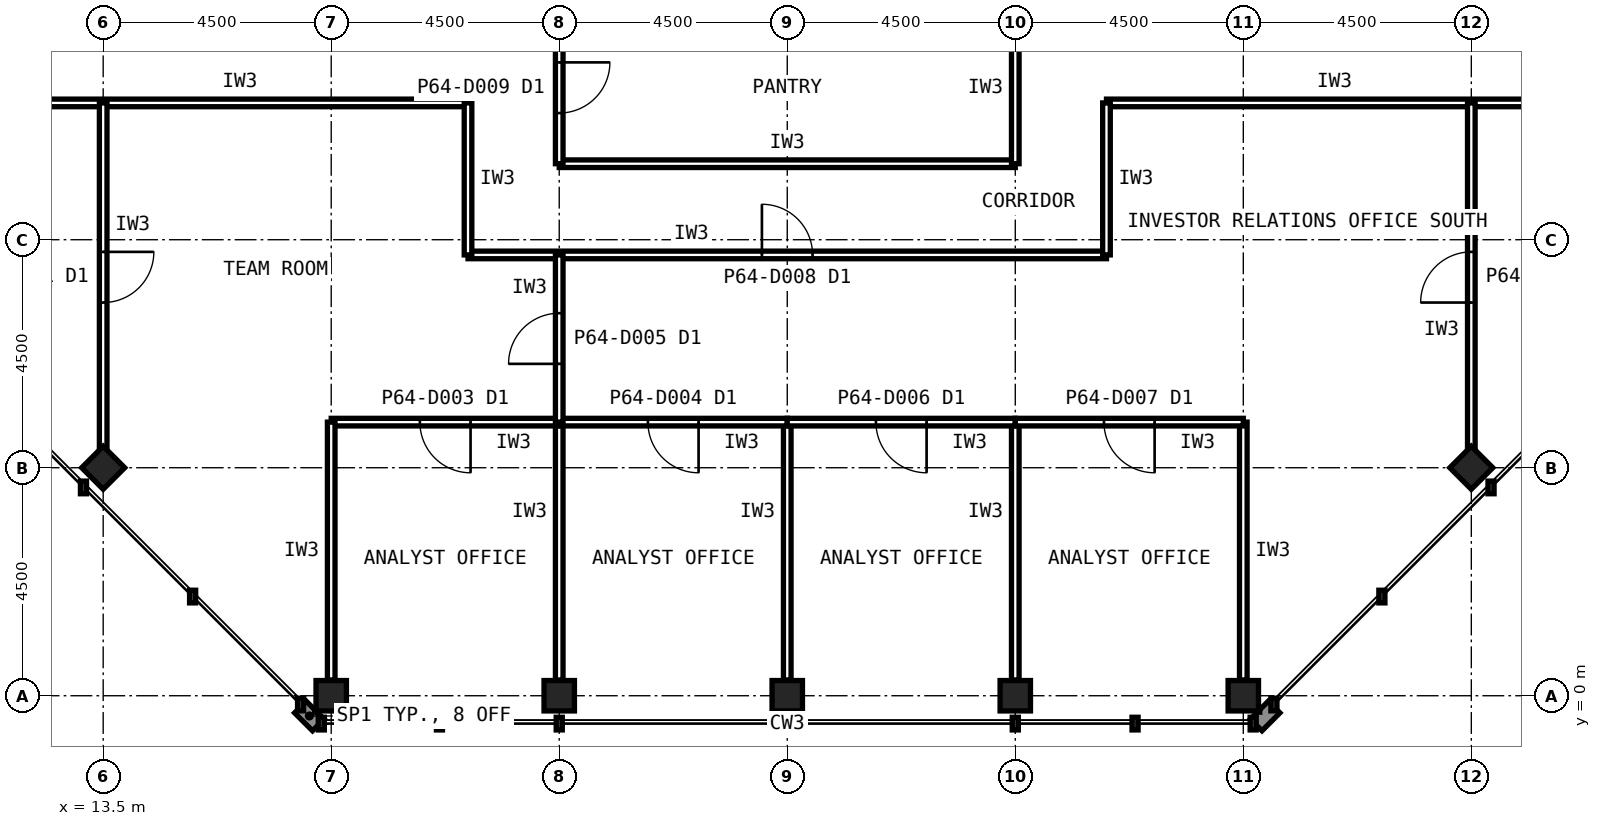
"""IFC4 building model, lengths in metres.
Left out: names, types, materials, properties, quantities, classifications, styles, units other than length and angle.
Written with IfcOpenShell. Run it as: python <this file> out.ifc"""

import sys

from ifc_helpers import new_model, si_unit, direction, frame, frame_2d, origin, origin_2d, place, context, subcontext, project, spatial, rectangle, hollow_rectangle, extrude, element, fill, save


model = new_model("IFC4")
c1 = context("Model", 3, precision=1e-05, world=origin(), true_north=direction((0.0, 1.0)))
c2 = subcontext(c1, "Body", "Model", "MODEL_VIEW")
j1 = project(units=[si_unit("LENGTHUNIT", "METRE"), si_unit("PLANEANGLEUNIT", "RADIAN")], contexts=[c1])
p1 = place(None, origin())
s1 = spatial("IfcSite", under=j1, at=p1, CompositionType="ELEMENT")
p2 = place(p1, origin())
s2 = spatial("IfcBuilding", under=s1, at=p2, CompositionType="ELEMENT")
p3 = place(p2, frame((0.0, 0.0, 270.6)))
s3 = spatial("IfcBuildingStorey", under=s2, at=p3, CompositionType="ELEMENT", Elevation=270.6)
for number, where, z_axis, x_axis in (
    (1, (18.0, 0.0, 0.0), (0.0, 0.0, 1.0), (1.0, 0.0, 0.0)),
    (2, (22.5, 0.0, 0.0), (0.0, 0.0, 1.0), (1.0, 0.0, 0.0)),
    (3, (27.0, 0.0, 0.0), (0.0, 0.0, 1.0), (1.0, 0.0, 0.0)),
    (4, (31.5, 0.0, 0.0), (0.0, 0.0, 1.0), (1.0, 0.0, 0.0)),
    (5, (36.0, 0.0, 0.0), (0.0, 0.0, 1.0), (1.0, 0.0, 0.0)),
    (6, (13.5, 4.5, 0.0), (0.0, 0.0, 1.0), (0.707, 0.707, 0.0)),
    (7, (40.5, 4.5, 0.0), (0.0, 0.0, 1.0), (0.707, 0.707, 0.0)),
):
    element("IfcColumn", number, at=place(p3, frame(where, z_axis=z_axis, x_axis=x_axis)), inside=s3, PredefinedType="COLUMN", context=c2, shape_type="SweptSolid", body=[
        extrude(hollow_rectangle(XDim=0.6, YDim=0.6, WallThickness=0.028, at=origin_2d()), origin(), (0.0, 0.0, 1.0), 4.0),
    ])
p4 = place(p3, frame((20.7, 8.7, 0.0), z_axis=(0.0, 0.0, 1.0), x_axis=(1.0, 0.0, 0.0)))
e8 = element("IfcWall", 8, at=p4, inside=s3, PredefinedType="PARTITIONING", context=c2, shape_type="SweptSolid", body=[
    extrude(rectangle(XDim=12.6, YDim=0.15, at=frame_2d((6.3, 0.0))), origin(), (0.0, 0.0, 1.0), 3.84),
])
p5 = place(p4, frame((5.8, 0.0, 0.0)))
e9 = element("IfcOpeningElement", 9, at=p5, cuts=e8, PredefinedType="OPENING", context=c2, shape_type="SweptSolid", body=[
    extrude(rectangle(XDim=1.0, YDim=2.1, at=frame_2d((0.5, 1.05))), frame((0.0, 0.085, 0.0), z_axis=(0.0, -1.0, 0.0), x_axis=(1.0, 0.0, 0.0)), (0.0, 0.0, 1.0), 0.17),
])
for number, where, z_axis, x_axis in (
    (10, (11.7, 11.7, 0.0), (0.0, 0.0, 1.0), (1.0, 0.0, 0.0)),
    (11, (33.3, 11.7, 0.0), (0.0, 0.0, 1.0), (1.0, 0.0, 0.0)),
):
    element("IfcWall", number, at=place(p3, frame(where, z_axis=z_axis, x_axis=x_axis)), inside=s3, PredefinedType="PARTITIONING", context=c2, shape_type="SweptSolid", body=[
        extrude(rectangle(XDim=9.0, YDim=0.15, at=frame_2d((4.5, 0.0))), origin(), (0.0, 0.0, 1.0), 3.84),
    ])
for number, where, z_axis, x_axis in (
    (12, (20.7, 11.7, 0.0), (0.0, 0.0, 1.0), (0.0, -1.0, 0.0)),
    (13, (33.3, 8.7, 0.0), (0.0, 0.0, 1.0), (0.0, 1.0, 0.0)),
):
    element("IfcWall", number, at=place(p3, frame(where, z_axis=z_axis, x_axis=x_axis)), inside=s3, PredefinedType="PARTITIONING", context=c2, shape_type="SweptSolid", body=[
        extrude(rectangle(XDim=3.0, YDim=0.15, at=frame_2d((1.5, 0.0))), origin(), (0.0, 0.0, 1.0), 3.84),
    ])
p6 = place(p3, frame((22.5, 10.5, 0.0), z_axis=(0.0, 0.0, 1.0), x_axis=(1.0, 0.0, 0.0)))
e14 = element("IfcWall", 14, at=p6, inside=s3, PredefinedType="PARTITIONING", context=c2, shape_type="SweptSolid", body=[
    extrude(rectangle(XDim=9.0, YDim=0.15, at=frame_2d((4.5, 0.0))), origin(), (0.0, 0.0, 1.0), 3.84),
])
p7 = place(p3, frame((31.5, 10.5, 0.0), z_axis=(0.0, 0.0, 1.0), x_axis=(0.0, 1.0, 0.0)))
e15 = element("IfcWall", 15, at=p7, inside=s3, PredefinedType="PARTITIONING", context=c2, shape_type="SweptSolid", body=[
    extrude(rectangle(XDim=3.0, YDim=0.15, at=frame_2d((1.5, 0.0))), origin(), (0.0, 0.0, 1.0), 2.989),
])
p8 = place(p3, frame((22.5, 13.5, 0.0), z_axis=(0.0, 0.0, 1.0), x_axis=(0.0, -1.0, 0.0)))
e16 = element("IfcWall", 16, at=p8, inside=s3, PredefinedType="PARTITIONING", context=c2, shape_type="SweptSolid", body=[
    extrude(rectangle(XDim=3.0, YDim=0.15, at=frame_2d((1.5, 0.0))), origin(), (0.0, 0.0, 1.0), 2.989),
])
p9 = place(p8, frame((1.0, 0.0, 0.0)))
e17 = element("IfcOpeningElement", 17, at=p9, cuts=e16, PredefinedType="OPENING", context=c2, shape_type="SweptSolid", body=[
    extrude(rectangle(XDim=1.0, YDim=2.1, at=frame_2d((0.5, 1.05))), frame((0.0, 0.085, 0.0), z_axis=(0.0, -1.0, 0.0), x_axis=(1.0, 0.0, 0.0)), (0.0, 0.0, 1.0), 0.17),
])
p10 = place(p3, frame((22.5, 0.31, 0.0), z_axis=(0.0, 0.0, 1.0), x_axis=(0.0, 1.0, 0.0)))
e18 = element("IfcWall", 18, at=p10, inside=s3, PredefinedType="PARTITIONING", context=c2, shape_type="SweptSolid", body=[
    extrude(rectangle(XDim=5.09, YDim=0.15, at=frame_2d((2.545, 0.0))), origin(), (0.0, 0.0, 1.0), 2.989),
])
p11 = place(p3, frame((22.5, 5.4, 0.0), z_axis=(0.0, 0.0, 1.0), x_axis=(-1.0, 0.0, 0.0)))
e19 = element("IfcWall", 19, at=p11, inside=s3, PredefinedType="PARTITIONING", context=c2, shape_type="SweptSolid", body=[
    extrude(rectangle(XDim=4.5, YDim=0.15, at=frame_2d((2.25, 0.0))), origin(), (0.0, 0.0, 1.0), 3.84),
])
p12 = place(p11, frame((1.75, 0.0, 0.0)))
e20 = element("IfcOpeningElement", 20, at=p12, cuts=e19, PredefinedType="OPENING", context=c2, shape_type="SweptSolid", body=[
    extrude(rectangle(XDim=1.0, YDim=2.1, at=frame_2d((0.5, 1.05))), frame((0.0, 0.085, 0.0), z_axis=(0.0, -1.0, 0.0), x_axis=(1.0, 0.0, 0.0)), (0.0, 0.0, 1.0), 0.17),
])
for number, where, z_axis, x_axis in (
    (21, (18.0, 5.4, 0.0), (0.0, 0.0, 1.0), (0.0, -1.0, 0.0)),
    (22, (27.0, 0.31, 0.0), (0.0, 0.0, 1.0), (0.0, 1.0, 0.0)),
):
    element("IfcWall", number, at=place(p3, frame(where, z_axis=z_axis, x_axis=x_axis)), inside=s3, PredefinedType="PARTITIONING", context=c2, shape_type="SweptSolid", body=[
        extrude(rectangle(XDim=5.09, YDim=0.15, at=frame_2d((2.545, 0.0))), origin(), (0.0, 0.0, 1.0), 2.989),
    ])
p13 = place(p3, frame((27.0, 5.4, 0.0), z_axis=(0.0, 0.0, 1.0), x_axis=(-1.0, 0.0, 0.0)))
e23 = element("IfcWall", 23, at=p13, inside=s3, PredefinedType="PARTITIONING", context=c2, shape_type="SweptSolid", body=[
    extrude(rectangle(XDim=4.5, YDim=0.15, at=frame_2d((2.25, 0.0))), origin(), (0.0, 0.0, 1.0), 3.84),
])
p14 = place(p13, frame((1.75, 0.0, 0.0)))
e24 = element("IfcOpeningElement", 24, at=p14, cuts=e23, PredefinedType="OPENING", context=c2, shape_type="SweptSolid", body=[
    extrude(rectangle(XDim=1.0, YDim=2.1, at=frame_2d((0.5, 1.05))), frame((0.0, 0.085, 0.0), z_axis=(0.0, -1.0, 0.0), x_axis=(1.0, 0.0, 0.0)), (0.0, 0.0, 1.0), 0.17),
])
p15 = place(p3, frame((31.5, 0.31, 0.0), z_axis=(0.0, 0.0, 1.0), x_axis=(0.0, 1.0, 0.0)))
e25 = element("IfcWall", 25, at=p15, inside=s3, PredefinedType="PARTITIONING", context=c2, shape_type="SweptSolid", body=[
    extrude(rectangle(XDim=5.09, YDim=0.15, at=frame_2d((2.545, 0.0))), origin(), (0.0, 0.0, 1.0), 2.989),
])
p16 = place(p3, frame((31.5, 5.4, 0.0), z_axis=(0.0, 0.0, 1.0), x_axis=(-1.0, 0.0, 0.0)))
e26 = element("IfcWall", 26, at=p16, inside=s3, PredefinedType="PARTITIONING", context=c2, shape_type="SweptSolid", body=[
    extrude(rectangle(XDim=4.5, YDim=0.15, at=frame_2d((2.25, 0.0))), origin(), (0.0, 0.0, 1.0), 3.84),
])
p17 = place(p16, frame((1.75, 0.0, 0.0)))
e27 = element("IfcOpeningElement", 27, at=p17, cuts=e26, PredefinedType="OPENING", context=c2, shape_type="SweptSolid", body=[
    extrude(rectangle(XDim=1.0, YDim=2.1, at=frame_2d((0.5, 1.05))), frame((0.0, 0.085, 0.0), z_axis=(0.0, -1.0, 0.0), x_axis=(1.0, 0.0, 0.0)), (0.0, 0.0, 1.0), 0.17),
])
p18 = place(p3, frame((36.0, 0.31, 0.0), z_axis=(0.0, 0.0, 1.0), x_axis=(0.0, 1.0, 0.0)))
e28 = element("IfcWall", 28, at=p18, inside=s3, PredefinedType="PARTITIONING", context=c2, shape_type="SweptSolid", body=[
    extrude(rectangle(XDim=5.09, YDim=0.15, at=frame_2d((2.545, 0.0))), origin(), (0.0, 0.0, 1.0), 2.989),
])
p19 = place(p3, frame((36.0, 5.4, 0.0), z_axis=(0.0, 0.0, 1.0), x_axis=(-1.0, 0.0, 0.0)))
e29 = element("IfcWall", 29, at=p19, inside=s3, PredefinedType="PARTITIONING", context=c2, shape_type="SweptSolid", body=[
    extrude(rectangle(XDim=4.5, YDim=0.15, at=frame_2d((2.25, 0.0))), origin(), (0.0, 0.0, 1.0), 3.84),
])
p20 = place(p19, frame((1.75, 0.0, 0.0)))
e30 = element("IfcOpeningElement", 30, at=p20, cuts=e29, PredefinedType="OPENING", context=c2, shape_type="SweptSolid", body=[
    extrude(rectangle(XDim=1.0, YDim=2.1, at=frame_2d((0.5, 1.05))), frame((0.0, 0.085, 0.0), z_axis=(0.0, -1.0, 0.0), x_axis=(1.0, 0.0, 0.0)), (0.0, 0.0, 1.0), 0.17),
])
p21 = place(p3, frame((40.5, 4.82, 0.0), z_axis=(0.0, 0.0, 1.0), x_axis=(0.0, 1.0, 0.0)))
e31 = element("IfcWall", 31, at=p21, inside=s3, PredefinedType="PARTITIONING", context=c2, shape_type="SweptSolid", body=[
    extrude(rectangle(XDim=6.88, YDim=0.15, at=frame_2d((3.44, 0.0))), origin(), (0.0, 0.0, 1.0), 2.989),
])
p22 = place(p21, frame((2.94, 0.0, 0.0)))
e32 = element("IfcOpeningElement", 32, at=p22, cuts=e31, PredefinedType="OPENING", context=c2, shape_type="SweptSolid", body=[
    extrude(rectangle(XDim=1.0, YDim=2.1, at=frame_2d((0.5, 1.05))), frame((0.0, 0.085, 0.0), z_axis=(0.0, -1.0, 0.0), x_axis=(1.0, 0.0, 0.0)), (0.0, 0.0, 1.0), 0.17),
])
p23 = place(p3, frame((22.5, 5.4, 0.0), z_axis=(0.0, 0.0, 1.0), x_axis=(0.0, 1.0, 0.0)))
e33 = element("IfcWall", 33, at=p23, inside=s3, PredefinedType="PARTITIONING", context=c2, shape_type="SweptSolid", body=[
    extrude(rectangle(XDim=3.3, YDim=0.15, at=frame_2d((1.65, 0.0))), origin(), (0.0, 0.0, 1.0), 2.989),
])
p24 = place(p23, frame((1.15, 0.0, 0.0)))
e34 = element("IfcOpeningElement", 34, at=p24, cuts=e33, PredefinedType="OPENING", context=c2, shape_type="SweptSolid", body=[
    extrude(rectangle(XDim=1.0, YDim=2.1, at=frame_2d((0.5, 1.05))), frame((0.0, 0.085, 0.0), z_axis=(0.0, -1.0, 0.0), x_axis=(1.0, 0.0, 0.0)), (0.0, 0.0, 1.0), 0.17),
])
p25 = place(p3, frame((13.5, 11.7, 0.0), z_axis=(0.0, 0.0, 1.0), x_axis=(0.0, -1.0, 0.0)))
e35 = element("IfcWall", 35, at=p25, inside=s3, PredefinedType="PARTITIONING", context=c2, shape_type="SweptSolid", body=[
    extrude(rectangle(XDim=6.88, YDim=0.15, at=frame_2d((3.44, 0.0))), origin(), (0.0, 0.0, 1.0), 2.989),
])
p26 = place(p25, frame((2.94, 0.0, 0.0)))
e36 = element("IfcOpeningElement", 36, at=p26, cuts=e35, PredefinedType="OPENING", context=c2, shape_type="SweptSolid", body=[
    extrude(rectangle(XDim=1.0, YDim=2.1, at=frame_2d((0.5, 1.05))), frame((0.0, 0.085, 0.0), z_axis=(0.0, -1.0, 0.0), x_axis=(1.0, 0.0, 0.0)), (0.0, 0.0, 1.0), 0.17),
])
p27 = place(p5, origin())
e37 = element("IfcDoor", 37, at=p27, inside=s3, OperationType="SINGLE_SWING_LEFT", PredefinedType="DOOR", context=c2, shape_type="SweptSolid", body=[
    extrude(rectangle(XDim=1.0, YDim=2.1, at=frame_2d((0.5, 1.05))), frame((0.0, 0.025, 0.0), z_axis=(0.0, -1.0, 0.0), x_axis=(1.0, 0.0, 0.0)), (0.0, 0.0, 1.0), 0.05),
])
fill(e9, e37)
p28 = place(p9, origin())
e38 = element("IfcDoor", 38, at=p28, inside=s3, OperationType="SINGLE_SWING_LEFT", PredefinedType="DOOR", context=c2, shape_type="SweptSolid", body=[
    extrude(rectangle(XDim=1.0, YDim=2.1, at=frame_2d((0.5, 1.05))), frame((0.0, 0.025, 0.0), z_axis=(0.0, -1.0, 0.0), x_axis=(1.0, 0.0, 0.0)), (0.0, 0.0, 1.0), 0.05),
])
fill(e17, e38)
p29 = place(p12, origin())
e39 = element("IfcDoor", 39, at=p29, inside=s3, OperationType="SINGLE_SWING_LEFT", PredefinedType="DOOR", context=c2, shape_type="SweptSolid", body=[
    extrude(rectangle(XDim=1.0, YDim=2.1, at=frame_2d((0.5, 1.05))), frame((0.0, 0.025, 0.0), z_axis=(0.0, -1.0, 0.0), x_axis=(1.0, 0.0, 0.0)), (0.0, 0.0, 1.0), 0.05),
])
fill(e20, e39)
p30 = place(p14, origin())
e40 = element("IfcDoor", 40, at=p30, inside=s3, OperationType="SINGLE_SWING_LEFT", PredefinedType="DOOR", context=c2, shape_type="SweptSolid", body=[
    extrude(rectangle(XDim=1.0, YDim=2.1, at=frame_2d((0.5, 1.05))), frame((0.0, 0.025, 0.0), z_axis=(0.0, -1.0, 0.0), x_axis=(1.0, 0.0, 0.0)), (0.0, 0.0, 1.0), 0.05),
])
fill(e24, e40)
p31 = place(p17, origin())
e41 = element("IfcDoor", 41, at=p31, inside=s3, OperationType="SINGLE_SWING_LEFT", PredefinedType="DOOR", context=c2, shape_type="SweptSolid", body=[
    extrude(rectangle(XDim=1.0, YDim=2.1, at=frame_2d((0.5, 1.05))), frame((0.0, 0.025, 0.0), z_axis=(0.0, -1.0, 0.0), x_axis=(1.0, 0.0, 0.0)), (0.0, 0.0, 1.0), 0.05),
])
fill(e27, e41)
p32 = place(p20, origin())
e42 = element("IfcDoor", 42, at=p32, inside=s3, OperationType="SINGLE_SWING_LEFT", PredefinedType="DOOR", context=c2, shape_type="SweptSolid", body=[
    extrude(rectangle(XDim=1.0, YDim=2.1, at=frame_2d((0.5, 1.05))), frame((0.0, 0.025, 0.0), z_axis=(0.0, -1.0, 0.0), x_axis=(1.0, 0.0, 0.0)), (0.0, 0.0, 1.0), 0.05),
])
fill(e30, e42)
p33 = place(p22, origin())
e43 = element("IfcDoor", 43, at=p33, inside=s3, OperationType="SINGLE_SWING_LEFT", PredefinedType="DOOR", context=c2, shape_type="SweptSolid", body=[
    extrude(rectangle(XDim=1.0, YDim=2.1, at=frame_2d((0.5, 1.05))), frame((0.0, 0.025, 0.0), z_axis=(0.0, -1.0, 0.0), x_axis=(1.0, 0.0, 0.0)), (0.0, 0.0, 1.0), 0.05),
])
fill(e32, e43)
p34 = place(p24, origin())
e44 = element("IfcDoor", 44, at=p34, inside=s3, OperationType="SINGLE_SWING_LEFT", PredefinedType="DOOR", context=c2, shape_type="SweptSolid", body=[
    extrude(rectangle(XDim=1.0, YDim=2.1, at=frame_2d((0.5, 1.05))), frame((0.0, 0.025, 0.0), z_axis=(0.0, -1.0, 0.0), x_axis=(1.0, 0.0, 0.0)), (0.0, 0.0, 1.0), 0.05),
])
fill(e34, e44)
p35 = place(p26, origin())
e45 = element("IfcDoor", 45, at=p35, inside=s3, OperationType="SINGLE_SWING_LEFT", PredefinedType="DOOR", context=c2, shape_type="SweptSolid", body=[
    extrude(rectangle(XDim=1.0, YDim=2.1, at=frame_2d((0.5, 1.05))), frame((0.0, 0.025, 0.0), z_axis=(0.0, -1.0, 0.0), x_axis=(1.0, 0.0, 0.0)), (0.0, 0.0, 1.0), 0.05),
])
fill(e36, e45)
save(model, sys.argv[1])
